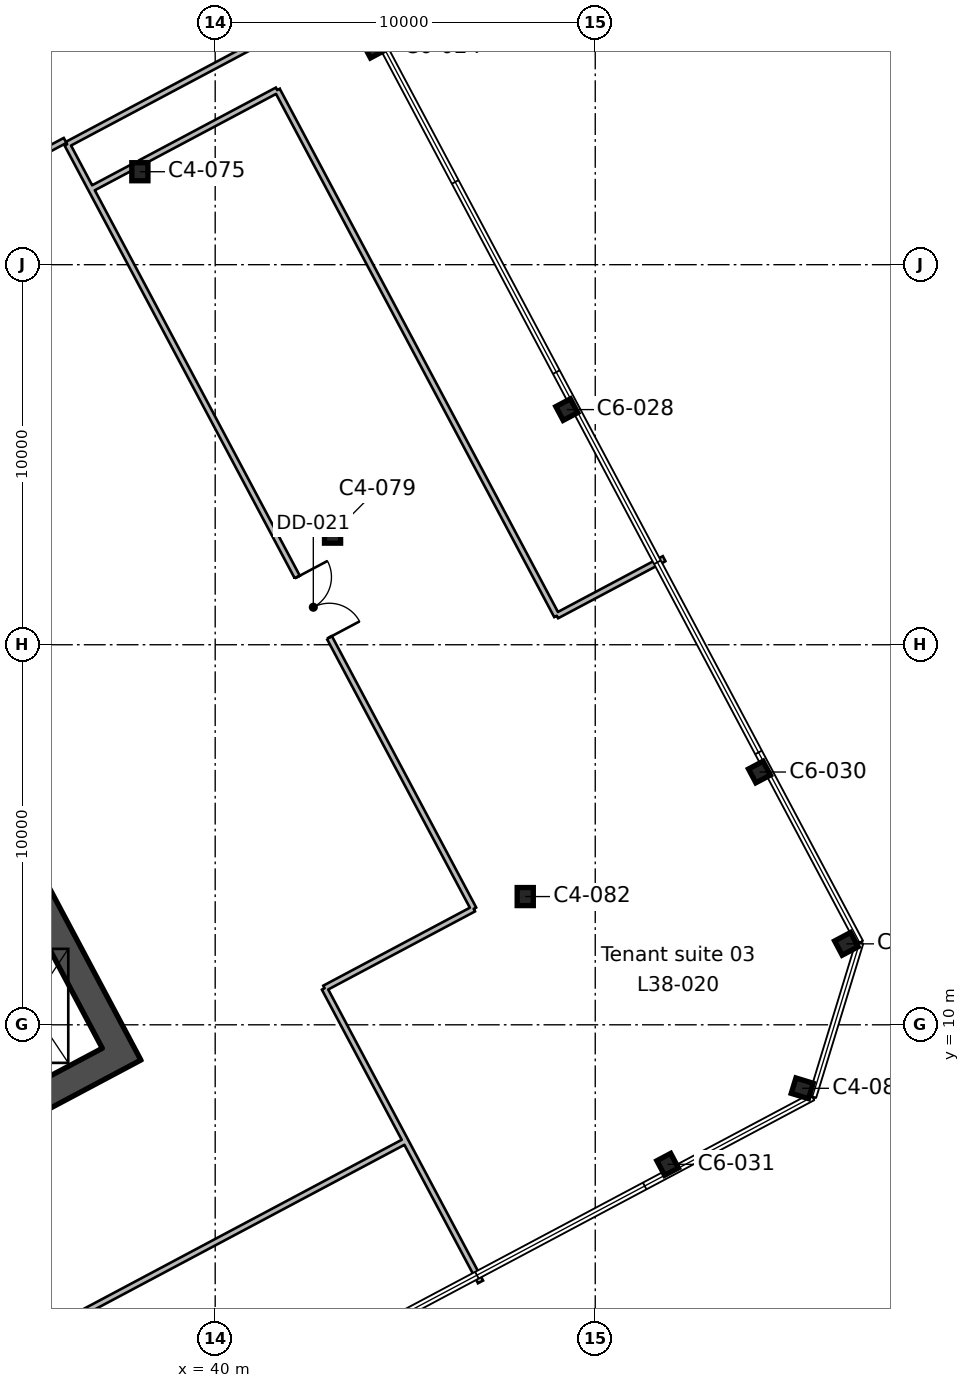
"""IFC4 building model, lengths in metres.
Left out: names, types, materials, properties, quantities, classifications, styles, units other than length and angle.
Written with IfcOpenShell. Run it as: python <this file> out.ifc"""

import sys

from ifc_helpers import new_model, si_unit, direction, frame, frame_2d, origin, origin_2d, place, context, subcontext, project, spatial, rectangle, i_section, extrude, element, fill, save


model = new_model("IFC4")
c1 = context("Model", 3, precision=1e-05, world=origin(), true_north=direction((0.0, 1.0)))
c2 = subcontext(c1, "Body", "Model", "MODEL_VIEW")
j1 = project(units=[si_unit("LENGTHUNIT", "METRE"), si_unit("PLANEANGLEUNIT", "RADIAN")], contexts=[c1])
p1 = place(None, origin())
s1 = spatial("IfcSite", under=j1, at=p1, CompositionType="ELEMENT")
p2 = place(p1, origin())
s2 = spatial("IfcBuilding", under=s1, at=p2, CompositionType="ELEMENT")
p3 = place(p2, frame((0.0, 0.0, 178.2)))
s3 = spatial("IfcBuildingStorey", under=s2, at=p3, CompositionType="ELEMENT", Elevation=178.2)
p4 = place(p3, frame((51.905, 6.328, 0.0), z_axis=(0.0, 0.0, 1.0), x_axis=(0.882947592859, 0.469471562786, 0.0)))
e1 = element("IfcColumn", 1, at=p4, inside=s3, PredefinedType="COLUMN", context=c2, shape_type="SweptSolid", body=[
    extrude(i_section(OverallWidth=0.412, OverallDepth=0.434, WebThickness=0.036, FlangeThickness=0.057, FilletRadius=0.015, at=origin_2d()), origin(), (0.0, 0.0, 1.0), 5.4),
])
for number, where, z_axis, x_axis in (
    (2, (55.446, 8.329, 0.0), (0.0, 0.0, 1.0), (0.292, 0.956, 0.0)),
    (3, (56.608, 12.13, 0.0), (0.0, 0.0, 1.0), (-0.469, 0.883, 0.0)),
    (4, (48.158, 13.374, 0.0), (0.0, 0.0, 1.0), (1.0, 0.0, 0.0)),
):
    element("IfcColumn", number, at=place(p3, frame(where, z_axis=z_axis, x_axis=x_axis)), inside=s3, PredefinedType="COLUMN", context=c2, shape_type="SweptSolid", body=[
        extrude(i_section(OverallWidth=0.424, OverallDepth=0.475, WebThickness=0.048, FlangeThickness=0.077, FilletRadius=0.015, at=origin_2d()), origin(), (0.0, 0.0, 1.0), 5.4),
    ])
p5 = place(p3, frame((54.321, 16.651, 0.0), z_axis=(0.0, 0.0, 1.0), x_axis=(-0.469471562786, 0.882947592859, 0.0)))
e5 = element("IfcColumn", 5, at=p5, inside=s3, PredefinedType="COLUMN", context=c2, shape_type="SweptSolid", body=[
    extrude(i_section(OverallWidth=0.412, OverallDepth=0.434, WebThickness=0.036, FlangeThickness=0.057, FilletRadius=0.015, at=origin_2d()), origin(), (0.0, 0.0, 1.0), 5.4),
])
p6 = place(p3, frame((43.088, 22.91, 0.0), z_axis=(0.0, 0.0, 1.0), x_axis=(1.0, 0.0, 0.0)))
e6 = element("IfcColumn", 6, at=p6, inside=s3, PredefinedType="COLUMN", context=c2, shape_type="SweptSolid", body=[
    extrude(i_section(OverallWidth=0.424, OverallDepth=0.475, WebThickness=0.048, FlangeThickness=0.077, FilletRadius=0.015, at=origin_2d()), origin(), (0.0, 0.0, 1.0), 5.4),
])
p7 = place(p3, frame((49.251, 26.187, 0.0), z_axis=(0.0, 0.0, 1.0), x_axis=(-0.469471562786, 0.882947592859, 0.0)))
e7 = element("IfcColumn", 7, at=p7, inside=s3, PredefinedType="COLUMN", context=c2, shape_type="SweptSolid", body=[
    extrude(i_section(OverallWidth=0.412, OverallDepth=0.434, WebThickness=0.036, FlangeThickness=0.057, FilletRadius=0.015, at=origin_2d()), origin(), (0.0, 0.0, 1.0), 5.4),
])
p8 = place(p3, frame((38.018, 32.446, 0.0), z_axis=(0.0, 0.0, 1.0), x_axis=(1.0, 0.0, 0.0)))
e8 = element("IfcColumn", 8, at=p8, inside=s3, PredefinedType="COLUMN", context=c2, shape_type="SweptSolid", body=[
    extrude(i_section(OverallWidth=0.424, OverallDepth=0.475, WebThickness=0.048, FlangeThickness=0.077, FilletRadius=0.015, at=origin_2d()), origin(), (0.0, 0.0, 1.0), 5.4),
])
p9 = place(p3, frame((44.181, 35.723, 0.0), z_axis=(0.0, 0.0, 1.0), x_axis=(-0.469471562786, 0.882947592859, 0.0)))
e9 = element("IfcColumn", 9, at=p9, inside=s3, PredefinedType="COLUMN", context=c2, shape_type="SweptSolid", body=[
    extrude(i_section(OverallWidth=0.412, OverallDepth=0.434, WebThickness=0.036, FlangeThickness=0.057, FilletRadius=0.015, at=origin_2d()), origin(), (0.0, 0.0, 1.0), 5.4),
])
p10 = place(p3, frame((37.713, 8.896, 0.0), z_axis=(0.0, 0.0, 1.0), x_axis=(-0.469469918705, 0.88294846703, 0.0)))
e10 = element("IfcWall", 10, at=p10, inside=s3, PredefinedType="SHEAR", context=c2, shape_type="SweptSolid", body=[
    extrude(rectangle(XDim=19.7, YDim=0.75, at=frame_2d((9.85, 0.0))), origin(), (0.0, 0.0, 1.0), 5.4),
])
p11 = place(p10, frame((10.45, 0.0, 0.0)))
e11 = element("IfcOpeningElement", 11, at=p11, cuts=e10, PredefinedType="OPENING", context=c2, shape_type="SweptSolid", body=[
    extrude(rectangle(XDim=2.4, YDim=2.4, at=frame_2d((1.2, 1.2))), frame((0.0, 0.385, 0.0), z_axis=(0.0, -1.0, 0.0), x_axis=(1.0, 0.0, 0.0)), (0.0, 0.0, 1.0), 0.77),
])
p12 = place(p3, frame((19.37, -0.432, 0.0), z_axis=(0.0, 0.0, 1.0), x_axis=(0.88294509198, 0.469476266226, 0.0)))
e12 = element("IfcWall", 12, at=p12, inside=s3, PredefinedType="SHEAR", context=c2, shape_type="SweptSolid", body=[
    extrude(rectangle(XDim=20.2, YDim=0.75, at=frame_2d((10.1, 0.0))), origin(), (0.0, 0.0, 1.0), 5.4),
])
p13 = place(p3, frame((45.009, 6.943, 0.0), z_axis=(0.0, 0.0, 1.0), x_axis=(-0.882937671178, -0.469490222279, 0.0)))
e13 = element("IfcWall", 13, at=p13, inside=s3, PredefinedType="PARTITIONING", context=c2, shape_type="SweptSolid", body=[
    extrude(rectangle(XDim=25.432, YDim=0.15, at=frame_2d((12.716, 0.0))), origin(), (0.0, 0.0, 1.0), 4.95),
])
p14 = place(p13, frame((15.25, 0.0, 0.0)))
e14 = element("IfcOpeningElement", 14, at=p14, cuts=e13, PredefinedType="OPENING", context=c2, shape_type="SweptSolid", body=[
    extrude(rectangle(XDim=1.0, YDim=2.1, at=frame_2d((0.5, 1.05))), frame((0.0, 0.085, 0.0), z_axis=(0.0, -1.0, 0.0), x_axis=(1.0, 0.0, 0.0)), (0.0, 0.0, 1.0), 0.17),
])
p15 = place(p13, frame((12.25, 0.0, 0.0)))
e15 = element("IfcOpeningElement", 15, at=p15, cuts=e13, PredefinedType="OPENING", context=c2, shape_type="SweptSolid", body=[
    extrude(rectangle(XDim=1.0, YDim=2.1, at=frame_2d((0.5, 1.05))), frame((0.0, 0.085, 0.0), z_axis=(0.0, -1.0, 0.0), x_axis=(1.0, 0.0, 0.0)), (0.0, 0.0, 1.0), 0.17),
])
p16 = place(p3, frame((32.122, 31.18, 0.0), z_axis=(0.0, 0.0, 1.0), x_axis=(0.882897554083, 0.469565659939, 0.0)))
e16 = element("IfcWall", 16, at=p16, inside=s3, PredefinedType="PARTITIONING", context=c2, shape_type="SweptSolid", body=[
    extrude(rectangle(XDim=4.45, YDim=0.15, at=frame_2d((2.225, 0.0))), origin(), (0.0, 0.0, 1.0), 4.95),
])
p17 = place(p3, frame((36.104, 33.169, 0.0), z_axis=(0.0, 0.0, 1.0), x_axis=(0.46953826462, -0.882912123633, 0.0)))
e17 = element("IfcWall", 17, at=p17, inside=s3, PredefinedType="PARTITIONING", context=c2, shape_type="SweptSolid", body=[
    extrude(rectangle(XDim=2.547, YDim=0.15, at=frame_2d((1.274, 0.0))), origin(), (0.0, 0.0, 1.0), 4.95),
])
p18 = place(p3, frame((43.832, 37.274, 0.0), z_axis=(0.0, 0.0, 1.0), x_axis=(-0.882953105758, -0.469461194384, 0.0)))
e18 = element("IfcWall", 18, at=p18, inside=s3, PredefinedType="PARTITIONING", context=c2, shape_type="SweptSolid", body=[
    extrude(rectangle(XDim=8.75, YDim=0.15, at=frame_2d((4.375, 0.0))), origin(), (0.0, 0.0, 1.0), 4.95),
])
p19 = place(p3, frame((36.732, 31.989, 0.0), z_axis=(0.0, 0.0, 1.0), x_axis=(0.882946743373, 0.469473160434, 0.0)))
e19 = element("IfcWall", 19, at=p19, inside=s3, PredefinedType="PARTITIONING", context=c2, shape_type="SweptSolid", body=[
    extrude(rectangle(XDim=1.216, YDim=0.15, at=frame_2d((0.608, 0.0))), origin(), (0.0, 0.0, 1.0), 4.95),
])
p20 = place(p3, frame((38.038, 32.683, 0.0), z_axis=(0.0, 0.0, 1.0), x_axis=(0.88295491585, 0.469457789984, 0.0)))
e20 = element("IfcWall", 20, at=p20, inside=s3, PredefinedType="PARTITIONING", context=c2, shape_type="SweptSolid", body=[
    extrude(rectangle(XDim=4.07, YDim=0.15, at=frame_2d((2.035, 0.0))), origin(), (0.0, 0.0, 1.0), 4.95),
])
p21 = place(p3, frame((41.632, 34.594, 0.0), z_axis=(0.0, 0.0, 1.0), x_axis=(0.469489427625, -0.882938093724, 0.0)))
e21 = element("IfcWall", 21, at=p21, inside=s3, PredefinedType="PARTITIONING", context=c2, shape_type="SweptSolid", body=[
    extrude(rectangle(XDim=15.666, YDim=0.15, at=frame_2d((7.833, 0.0))), origin(), (0.0, 0.0, 1.0), 4.95),
])
p22 = place(p3, frame((48.987, 20.762, 0.0), z_axis=(0.0, 0.0, 1.0), x_axis=(0.883027796121, 0.469320691295, 0.0)))
e22 = element("IfcWall", 22, at=p22, inside=s3, PredefinedType="PARTITIONING", context=c2, shape_type="SweptSolid", body=[
    extrude(rectangle(XDim=3.2, YDim=0.15, at=frame_2d((1.6, 0.0))), origin(), (0.0, 0.0, 1.0), 4.95),
])
p23 = place(p3, frame((37.3, 30.92, 0.0), z_axis=(0.0, 0.0, 1.0), x_axis=(0.469485933673, -0.882939951573, 0.0)))
e23 = element("IfcWall", 23, at=p23, inside=s3, PredefinedType="PARTITIONING", context=c2, shape_type="SweptSolid", body=[
    extrude(rectangle(XDim=20.239, YDim=0.15, at=frame_2d((10.12, 0.0))), origin(), (0.0, 0.0, 1.0), 4.95),
])
p24 = place(p23, frame((10.35, 0.0, 0.0)))
e24 = element("IfcOpeningElement", 24, at=p24, cuts=e23, PredefinedType="OPENING", context=c2, shape_type="SweptSolid", body=[
    extrude(rectangle(XDim=1.8, YDim=2.1, at=frame_2d((0.9, 1.05))), frame((0.0, 0.085, 0.0), z_axis=(0.0, -1.0, 0.0), x_axis=(1.0, 0.0, 0.0)), (0.0, 0.0, 1.0), 0.17),
])
p25 = place(p3, frame((46.802, 13.05, 0.0), z_axis=(0.0, 0.0, 1.0), x_axis=(-0.882883049263, -0.469592931509, 0.0)))
e25 = element("IfcWall", 25, at=p25, inside=s3, PredefinedType="PARTITIONING", context=c2, shape_type="SweptSolid", body=[
    extrude(rectangle(XDim=4.445, YDim=0.15, at=frame_2d((2.222, 0.0))), origin(), (0.0, 0.0, 1.0), 4.95),
])
p26 = place(p3, frame((46.981, 3.235, 0.0), z_axis=(0.0, 0.0, 1.0), x_axis=(-0.469519026901, 0.882922354105, 0.0)))
e26 = element("IfcWall", 26, at=p26, inside=s3, PredefinedType="PARTITIONING", context=c2, shape_type="SweptSolid", body=[
    extrude(rectangle(XDim=8.749, YDim=0.15, at=frame_2d((4.375, 0.0))), origin(), (0.0, 0.0, 1.0), 4.95),
])
p27 = place(p24, origin())
e27 = element("IfcDoor", 27, at=p27, inside=s3, OperationType="DOUBLE_DOOR_SINGLE_SWING", PredefinedType="DOOR", context=c2, shape_type="SweptSolid", body=[
    extrude(rectangle(XDim=1.8, YDim=2.1, at=frame_2d((0.9, 1.05))), frame((0.0, 0.025, 0.0), z_axis=(0.0, -1.0, 0.0), x_axis=(1.0, 0.0, 0.0)), (0.0, 0.0, 1.0), 0.05),
])
fill(e24, e27)
save(model, sys.argv[1])
